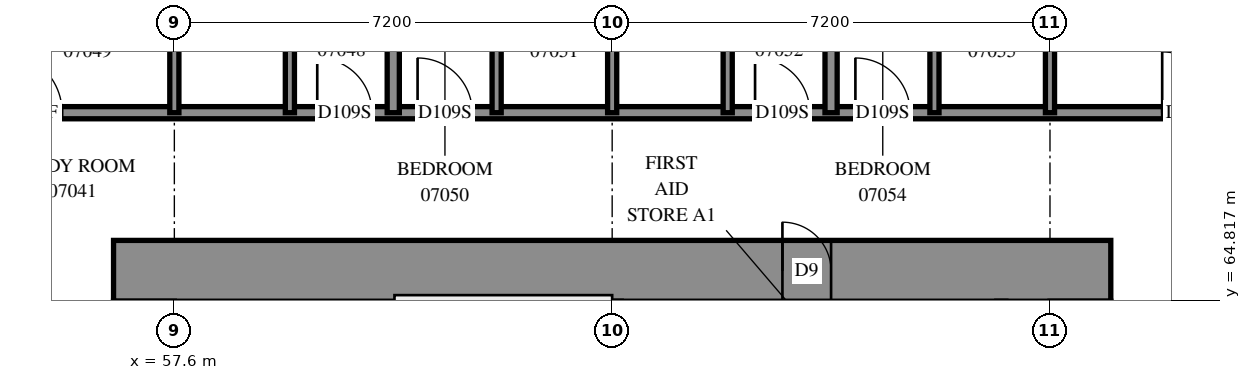
"""IFC4 building model, lengths in metres.
Left out: names, types, materials, properties, quantities, classifications, styles, units other than length and angle.
Written with IfcOpenShell. Run it as: python <this file> out.ifc"""

import sys

from ifc_helpers import new_model, si_unit, direction, frame, frame_2d, origin, place, context, subcontext, project, spatial, rectangle, extrude, element, fill, save


model = new_model("IFC4")
c1 = context("Model", 3, precision=1e-05, world=origin(), true_north=direction((0.0, 1.0)))
c2 = subcontext(c1, "Body", "Model", "MODEL_VIEW")
j1 = project(units=[si_unit("LENGTHUNIT", "METRE"), si_unit("PLANEANGLEUNIT", "RADIAN")], contexts=[c1])
p1 = place(None, origin())
s1 = spatial("IfcSite", under=j1, at=p1, CompositionType="ELEMENT")
p2 = place(p1, origin())
s2 = spatial("IfcBuilding", under=s1, at=p2, CompositionType="ELEMENT")
p3 = place(p2, frame((0.0, 0.0, 30.4)))
s3 = spatial("IfcBuildingStorey", under=s2, at=p3, CompositionType="ELEMENT", Elevation=30.4)
p4 = place(p3, frame((56.6, 65.3, -0.3), z_axis=(0.0, 0.0, 1.0), x_axis=(1.0, 0.0, 0.0)))
e1 = element("IfcWall", 1, at=p4, inside=s3, PredefinedType="SHEAR", context=c2, shape_type="SweptSolid", body=[
    extrude(rectangle(XDim=16.4, YDim=1.0, at=frame_2d((8.2, 0.0))), origin(), (0.0, 0.0, 1.0), 2.7),
])
p5 = place(p4, frame((11.0, 0.0, 0.3)))
e2 = element("IfcOpeningElement", 2, at=p5, cuts=e1, PredefinedType="OPENING", context=c2, shape_type="SweptSolid", body=[
    extrude(rectangle(XDim=0.8, YDim=2.1, at=frame_2d((0.4, 1.05))), frame((0.0, 0.51, 0.0), z_axis=(0.0, -1.0, 0.0), x_axis=(1.0, 0.0, 0.0)), (0.0, 0.0, 1.0), 1.02),
])
p6 = place(p3, frame((54.5, 67.9, 0.0), z_axis=(0.0, 0.0, 1.0), x_axis=(1.0, 0.0, 0.0)))
e3 = element("IfcWall", 3, at=p6, inside=s3, PredefinedType="PARTITIONING", context=c2, shape_type="SweptSolid", body=[
    extrude(rectangle(XDim=20.6, YDim=0.2, at=frame_2d((10.3, 0.0))), origin(), (0.0, 0.0, 1.0), 3.1),
])
p7 = place(p6, frame((0.255, 0.0, 0.0)))
e4 = element("IfcOpeningElement", 4, at=p7, cuts=e3, PredefinedType="OPENING", context=c2, shape_type="SweptSolid", body=[
    extrude(rectangle(XDim=1.0, YDim=2.1, at=frame_2d((0.5, 1.05))), frame((0.0, 0.11, 0.0), z_axis=(0.0, -1.0, 0.0), x_axis=(1.0, 0.0, 0.0)), (0.0, 0.0, 1.0), 0.22),
])
p8 = place(p6, frame((19.345, 0.0, 0.0)))
e5 = element("IfcOpeningElement", 5, at=p8, cuts=e3, PredefinedType="OPENING", context=c2, shape_type="SweptSolid", body=[
    extrude(rectangle(XDim=1.0, YDim=2.1, at=frame_2d((0.5, 1.05))), frame((0.0, 0.11, 0.0), z_axis=(0.0, -1.0, 0.0), x_axis=(1.0, 0.0, 0.0)), (0.0, 0.0, 1.0), 0.22),
])
p9 = place(p6, frame((5.45, 0.0, 0.0)))
e6 = element("IfcOpeningElement", 6, at=p9, cuts=e3, PredefinedType="OPENING", context=c2, shape_type="SweptSolid", body=[
    extrude(rectangle(XDim=0.9, YDim=2.1, at=frame_2d((0.45, 1.05))), frame((0.0, 0.11, 0.0), z_axis=(0.0, -1.0, 0.0), x_axis=(1.0, 0.0, 0.0)), (0.0, 0.0, 1.0), 0.22),
])
p10 = place(p6, frame((7.1, 0.0, 0.0)))
e7 = element("IfcOpeningElement", 7, at=p10, cuts=e3, PredefinedType="OPENING", context=c2, shape_type="SweptSolid", body=[
    extrude(rectangle(XDim=0.9, YDim=2.1, at=frame_2d((0.45, 1.05))), frame((0.0, 0.11, 0.0), z_axis=(0.0, -1.0, 0.0), x_axis=(1.0, 0.0, 0.0)), (0.0, 0.0, 1.0), 0.22),
])
p11 = place(p6, frame((12.65, 0.0, 0.0)))
e8 = element("IfcOpeningElement", 8, at=p11, cuts=e3, PredefinedType="OPENING", context=c2, shape_type="SweptSolid", body=[
    extrude(rectangle(XDim=0.9, YDim=2.1, at=frame_2d((0.45, 1.05))), frame((0.0, 0.11, 0.0), z_axis=(0.0, -1.0, 0.0), x_axis=(1.0, 0.0, 0.0)), (0.0, 0.0, 1.0), 0.22),
])
p12 = place(p6, frame((14.3, 0.0, 0.0)))
e9 = element("IfcOpeningElement", 9, at=p12, cuts=e3, PredefinedType="OPENING", context=c2, shape_type="SweptSolid", body=[
    extrude(rectangle(XDim=0.9, YDim=2.1, at=frame_2d((0.45, 1.05))), frame((0.0, 0.11, 0.0), z_axis=(0.0, -1.0, 0.0), x_axis=(1.0, 0.0, 0.0)), (0.0, 0.0, 1.0), 0.22),
])
p13 = place(p3, frame((68.4, 67.9, 0.0), z_axis=(0.0, 0.0, 1.0), x_axis=(0.0, 1.0, 0.0)))
e10 = element("IfcWall", 10, at=p13, inside=s3, PredefinedType="PARTITIONING", context=c2, shape_type="SweptSolid", body=[
    extrude(rectangle(XDim=4.776, YDim=0.2, at=frame_2d((2.388, 0.0))), origin(), (0.0, 0.0, 1.0), 3.1),
])
p14 = place(p3, frame((61.2, 67.9, 0.0), z_axis=(0.0, 0.0, 1.0), x_axis=(0.0, 1.0, 0.0)))
e11 = element("IfcWall", 11, at=p14, inside=s3, PredefinedType="PARTITIONING", context=c2, shape_type="SweptSolid", body=[
    extrude(rectangle(XDim=4.753, YDim=0.2, at=frame_2d((2.377, 0.0))), origin(), (0.0, 0.0, 1.0), 3.1),
])
for number, where, z_axis, x_axis in (
    (12, (59.5, 67.9, 0.0), (0.0, 0.0, 1.0), (0.0, 1.0, 0.0)),
    (13, (57.6, 67.9, 0.0), (0.0, 0.0, 1.0), (0.0, 1.0, 0.0)),
    (14, (62.9, 67.9, 0.0), (0.0, 0.0, 1.0), (0.0, 1.0, 0.0)),
    (15, (66.7, 67.9, 0.0), (0.0, 0.0, 1.0), (0.0, 1.0, 0.0)),
    (16, (64.8, 67.9, 0.0), (0.0, 0.0, 1.0), (0.0, 1.0, 0.0)),
    (17, (70.1, 67.9, 0.0), (0.0, 0.0, 1.0), (0.0, 1.0, 0.0)),
    (18, (72.0, 67.9, 0.0), (0.0, 0.0, 1.0), (0.0, 1.0, 0.0)),
):
    element("IfcWall", number, at=place(p3, frame(where, z_axis=z_axis, x_axis=x_axis)), inside=s3, PredefinedType="PARTITIONING", context=c2, shape_type="SweptSolid", body=[
        extrude(rectangle(XDim=2.4, YDim=0.15, at=frame_2d((1.2, 0.0))), origin(), (0.0, 0.0, 1.0), 3.1),
    ])
p15 = place(p5, origin())
e19 = element("IfcDoor", 19, at=p15, inside=s3, OperationType="SINGLE_SWING_RIGHT", PredefinedType="DOOR", context=c2, shape_type="SweptSolid", body=[
    extrude(rectangle(XDim=0.8, YDim=2.1, at=frame_2d((0.4, 1.05))), frame((0.0, -0.44, 0.0), z_axis=(0.0, -1.0, 0.0), x_axis=(1.0, 0.0, 0.0)), (0.0, 0.0, 1.0), 0.05),
])
fill(e2, e19)
p16 = place(p7, origin())
e20 = element("IfcDoor", 20, at=p16, inside=s3, OperationType="SINGLE_SWING_LEFT", PredefinedType="DOOR", context=c2, shape_type="SweptSolid", body=[
    extrude(rectangle(XDim=1.0, YDim=2.1, at=frame_2d((0.5, 1.05))), frame((0.0, 0.025, 0.0), z_axis=(0.0, -1.0, 0.0), x_axis=(1.0, 0.0, 0.0)), (0.0, 0.0, 1.0), 0.05),
])
fill(e4, e20)
p17 = place(p8, origin())
e21 = element("IfcDoor", 21, at=p17, inside=s3, OperationType="SINGLE_SWING_RIGHT", PredefinedType="DOOR", context=c2, shape_type="SweptSolid", body=[
    extrude(rectangle(XDim=1.0, YDim=2.1, at=frame_2d((0.5, 1.05))), frame((0.0, 0.025, 0.0), z_axis=(0.0, -1.0, 0.0), x_axis=(1.0, 0.0, 0.0)), (0.0, 0.0, 1.0), 0.05),
])
fill(e5, e21)
p18 = place(p9, origin())
e22 = element("IfcDoor", 22, at=p18, inside=s3, OperationType="SINGLE_SWING_RIGHT", PredefinedType="DOOR", context=c2, shape_type="SweptSolid", body=[
    extrude(rectangle(XDim=0.9, YDim=2.1, at=frame_2d((0.45, 1.05))), frame((0.0, 0.025, 0.0), z_axis=(0.0, -1.0, 0.0), x_axis=(1.0, 0.0, 0.0)), (0.0, 0.0, 1.0), 0.05),
])
fill(e6, e22)
p19 = place(p10, origin())
e23 = element("IfcDoor", 23, at=p19, inside=s3, OperationType="SINGLE_SWING_LEFT", PredefinedType="DOOR", context=c2, shape_type="SweptSolid", body=[
    extrude(rectangle(XDim=0.9, YDim=2.1, at=frame_2d((0.45, 1.05))), frame((0.0, 0.025, 0.0), z_axis=(0.0, -1.0, 0.0), x_axis=(1.0, 0.0, 0.0)), (0.0, 0.0, 1.0), 0.05),
])
fill(e7, e23)
p20 = place(p11, origin())
e24 = element("IfcDoor", 24, at=p20, inside=s3, OperationType="SINGLE_SWING_RIGHT", PredefinedType="DOOR", context=c2, shape_type="SweptSolid", body=[
    extrude(rectangle(XDim=0.9, YDim=2.1, at=frame_2d((0.45, 1.05))), frame((0.0, 0.025, 0.0), z_axis=(0.0, -1.0, 0.0), x_axis=(1.0, 0.0, 0.0)), (0.0, 0.0, 1.0), 0.05),
])
fill(e8, e24)
p21 = place(p12, origin())
e25 = element("IfcDoor", 25, at=p21, inside=s3, OperationType="SINGLE_SWING_LEFT", PredefinedType="DOOR", context=c2, shape_type="SweptSolid", body=[
    extrude(rectangle(XDim=0.9, YDim=2.1, at=frame_2d((0.45, 1.05))), frame((0.0, 0.025, 0.0), z_axis=(0.0, -1.0, 0.0), x_axis=(1.0, 0.0, 0.0)), (0.0, 0.0, 1.0), 0.05),
])
fill(e9, e25)
save(model, sys.argv[1])
